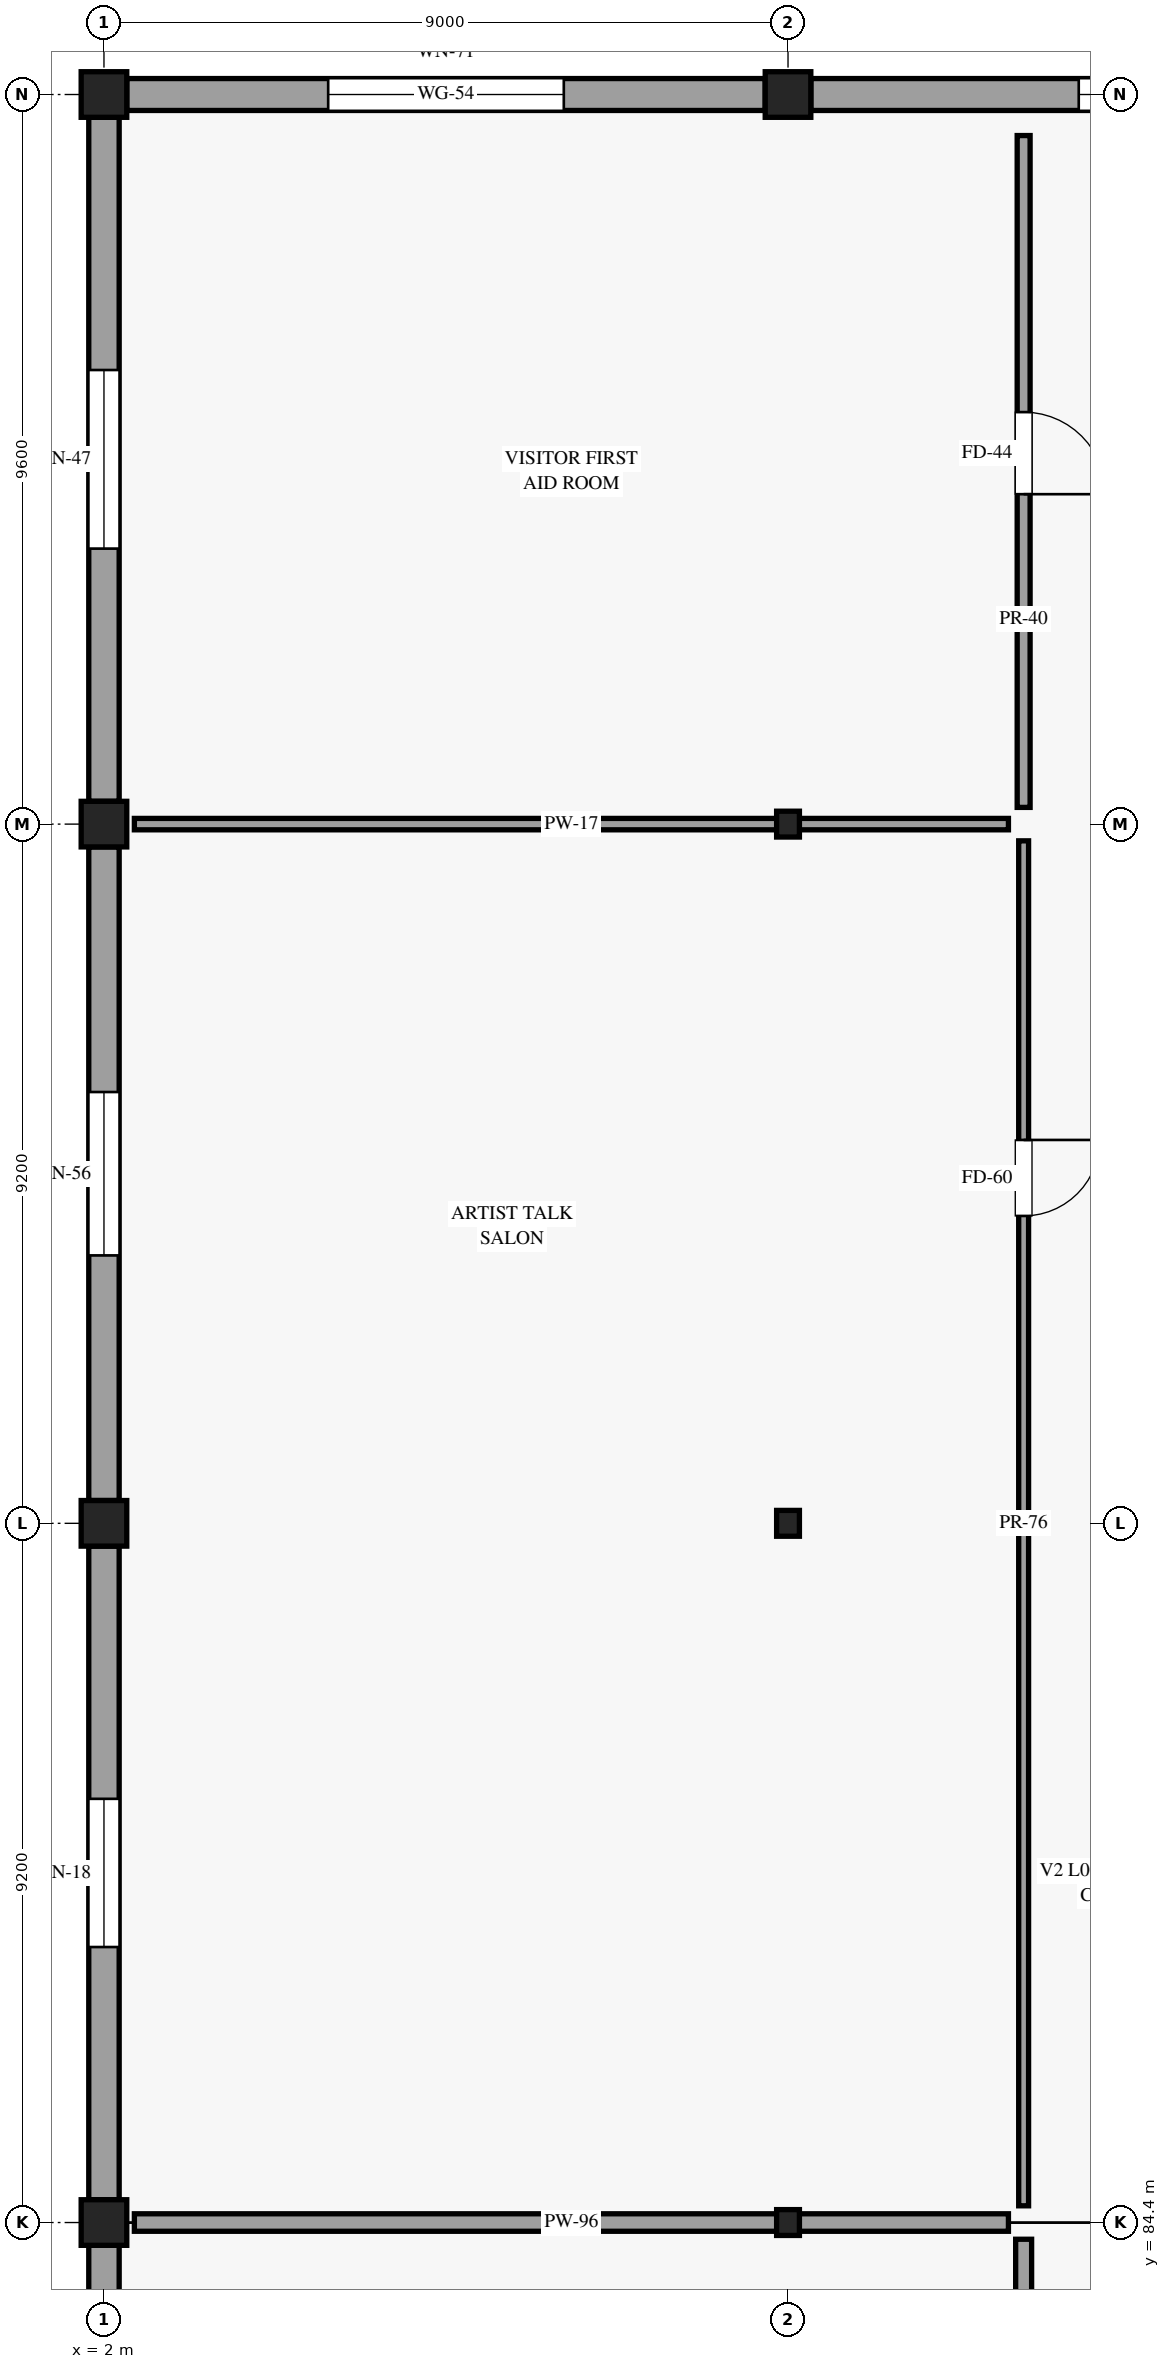
"""IFC4 building model, lengths in metres.
Left out: names, types, materials, properties, quantities, classifications, styles, units other than length and angle.
Written with IfcOpenShell. Run it as: python <this file> out.ifc"""

import sys

from ifc_helpers import new_model, si_unit, direction, frame, frame_2d, origin, origin_2d, place, context, subcontext, project, spatial, rectangle, i_section, extrude, element, fill, save


model = new_model("IFC4")
c1 = context("Model", 3, precision=1e-05, world=origin(), true_north=direction((0.0, 1.0)))
c2 = subcontext(c1, "Body", "Model", "MODEL_VIEW")
j1 = project(units=[si_unit("LENGTHUNIT", "METRE"), si_unit("PLANEANGLEUNIT", "RADIAN")], contexts=[c1])
p1 = place(None, origin())
s1 = spatial("IfcSite", under=j1, at=p1, CompositionType="ELEMENT")
p2 = place(p1, origin())
s2 = spatial("IfcBuilding", under=s1, at=p2, CompositionType="ELEMENT")
p3 = place(p2, origin())
s3 = spatial("IfcBuildingStorey", under=s2, at=p3, CompositionType="ELEMENT", Elevation=0.0)
for number, where, z_axis, x_axis in (
    (1, (2.0, 84.4, 0.0), (0.0, 0.0, 1.0), (1.0, 0.0, 0.0)),
    (2, (2.0, 93.6, 0.0), (0.0, 0.0, 1.0), (1.0, 0.0, 0.0)),
    (3, (2.0, 102.8, 0.0), (0.0, 0.0, 1.0), (1.0, 0.0, 0.0)),
    (4, (2.0, 112.4, 0.0), (0.0, 0.0, 1.0), (1.0, 0.0, 0.0)),
):
    element("IfcColumn", number, at=place(p3, frame(where, z_axis=z_axis, x_axis=x_axis)), inside=s3, PredefinedType="COLUMN", context=c2, shape_type="SweptSolid", body=[
        extrude(rectangle(XDim=0.6, YDim=0.6, at=origin_2d()), origin(), (0.0, 0.0, 1.0), 5.4),
    ])
for number, where, z_axis, x_axis in (
    (5, (11.0, 84.4, 0.0), (0.0, 0.0, 1.0), (1.0, 0.0, 0.0)),
    (6, (11.0, 93.6, 0.0), (0.0, 0.0, 1.0), (1.0, 0.0, 0.0)),
    (7, (11.0, 102.8, 0.0), (0.0, 0.0, 1.0), (1.0, 0.0, 0.0)),
):
    element("IfcColumn", number, at=place(p3, frame(where, z_axis=z_axis, x_axis=x_axis)), inside=s3, PredefinedType="COLUMN", context=c2, shape_type="SweptSolid", body=[
        extrude(i_section(OverallWidth=0.3, OverallDepth=0.34, WebThickness=0.012, FlangeThickness=0.021, FilletRadius=0.027, at=origin_2d()), origin(), (0.0, 0.0, 1.0), 5.4),
    ])
p4 = place(p3, frame((11.0, 112.4, 0.0), z_axis=(0.0, 0.0, 1.0), x_axis=(1.0, 0.0, 0.0)))
e8 = element("IfcColumn", 8, at=p4, inside=s3, PredefinedType="COLUMN", context=c2, shape_type="SweptSolid", body=[
    extrude(rectangle(XDim=0.6, YDim=0.6, at=origin_2d()), origin(), (0.0, 0.0, 1.0), 5.4),
])
p5 = place(p3, frame((2.3, 112.4, 0.0), z_axis=(0.0, 0.0, 1.0), x_axis=(1.0, 0.0, 0.0)))
e9 = element("IfcWall", 9, at=p5, inside=s3, PredefinedType="STANDARD", context=c2, shape_type="SweptSolid", body=[
    extrude(rectangle(XDim=8.4, YDim=0.42, at=frame_2d((4.2, 0.0))), origin(), (0.0, 0.0, 1.0), 4.605),
])
p6 = place(p5, frame((2.65, 0.0, 0.85)))
e10 = element("IfcOpeningElement", 10, at=p6, cuts=e9, PredefinedType="OPENING", context=c2, shape_type="SweptSolid", body=[
    extrude(rectangle(XDim=3.1, YDim=2.3, at=frame_2d((1.55, 1.15))), frame((0.0, 0.22, 0.0), z_axis=(0.0, -1.0, 0.0), x_axis=(1.0, 0.0, 0.0)), (0.0, 0.0, 1.0), 0.44),
])
p7 = place(p3, frame((11.3, 112.4, 0.0), z_axis=(0.0, 0.0, 1.0), x_axis=(1.0, 0.0, 0.0)))
e11 = element("IfcWall", 11, at=p7, inside=s3, PredefinedType="STANDARD", context=c2, shape_type="SweptSolid", body=[
    extrude(rectangle(XDim=8.4, YDim=0.42, at=frame_2d((4.2, 0.0))), origin(), (0.0, 0.0, 1.0), 4.605),
])
p8 = place(p7, frame((3.525, 0.0, 0.85)))
e12 = element("IfcOpeningElement", 12, at=p8, cuts=e11, PredefinedType="OPENING", context=c2, shape_type="SweptSolid", body=[
    extrude(rectangle(XDim=1.35, YDim=1.75, at=frame_2d((0.675, 0.875))), frame((0.0, 0.22, 0.0), z_axis=(0.0, -1.0, 0.0), x_axis=(1.0, 0.0, 0.0)), (0.0, 0.0, 1.0), 0.44),
])
p9 = place(p3, frame((2.0, 75.5, 0.0), z_axis=(0.0, 0.0, 1.0), x_axis=(0.0, 1.0, 0.0)))
e13 = element("IfcWall", 13, at=p9, inside=s3, PredefinedType="STANDARD", context=c2, shape_type="SweptSolid", body=[
    extrude(rectangle(XDim=8.6, YDim=0.4, at=frame_2d((4.3, 0.0))), origin(), (0.0, 0.0, 1.0), 4.605),
])
p10 = place(p9, frame((3.425, 0.0, 0.85)))
e14 = element("IfcOpeningElement", 14, at=p10, cuts=e13, PredefinedType="OPENING", context=c2, shape_type="SweptSolid", body=[
    extrude(rectangle(XDim=1.75, YDim=2.05, at=frame_2d((0.875, 1.025))), frame((0.0, 0.21, 0.0), z_axis=(0.0, -1.0, 0.0), x_axis=(1.0, 0.0, 0.0)), (0.0, 0.0, 1.0), 0.42),
])
p11 = place(p3, frame((2.0, 84.7, 0.0), z_axis=(0.0, 0.0, 1.0), x_axis=(0.0, 1.0, 0.0)))
e15 = element("IfcWall", 15, at=p11, inside=s3, PredefinedType="STANDARD", context=c2, shape_type="SweptSolid", body=[
    extrude(rectangle(XDim=8.6, YDim=0.4, at=frame_2d((4.3, 0.0))), origin(), (0.0, 0.0, 1.0), 4.605),
])
p12 = place(p11, frame((3.325, 0.0, 0.85)))
e16 = element("IfcOpeningElement", 16, at=p12, cuts=e15, PredefinedType="OPENING", context=c2, shape_type="SweptSolid", body=[
    extrude(rectangle(XDim=1.95, YDim=2.15, at=frame_2d((0.975, 1.075))), frame((0.0, 0.21, 0.0), z_axis=(0.0, -1.0, 0.0), x_axis=(1.0, 0.0, 0.0)), (0.0, 0.0, 1.0), 0.42),
])
p13 = place(p3, frame((2.0, 93.9, 0.0), z_axis=(0.0, 0.0, 1.0), x_axis=(0.0, 1.0, 0.0)))
e17 = element("IfcWall", 17, at=p13, inside=s3, PredefinedType="STANDARD", context=c2, shape_type="SweptSolid", body=[
    extrude(rectangle(XDim=8.6, YDim=0.4, at=frame_2d((4.3, 0.0))), origin(), (0.0, 0.0, 1.0), 4.605),
])
p14 = place(p13, frame((3.225, 0.0, 0.85)))
e18 = element("IfcOpeningElement", 18, at=p14, cuts=e17, PredefinedType="OPENING", context=c2, shape_type="SweptSolid", body=[
    extrude(rectangle(XDim=2.15, YDim=2.25, at=frame_2d((1.075, 1.125))), frame((0.0, 0.21, 0.0), z_axis=(0.0, -1.0, 0.0), x_axis=(1.0, 0.0, 0.0)), (0.0, 0.0, 1.0), 0.42),
])
p15 = place(p3, frame((2.0, 103.1, 0.0), z_axis=(0.0, 0.0, 1.0), x_axis=(0.0, 1.0, 0.0)))
e19 = element("IfcWall", 19, at=p15, inside=s3, PredefinedType="STANDARD", context=c2, shape_type="SweptSolid", body=[
    extrude(rectangle(XDim=9.0, YDim=0.4, at=frame_2d((4.5, 0.0))), origin(), (0.0, 0.0, 1.0), 4.605),
])
p16 = place(p15, frame((3.325, 0.0, 0.85)))
e20 = element("IfcOpeningElement", 20, at=p16, cuts=e19, PredefinedType="OPENING", context=c2, shape_type="SweptSolid", body=[
    extrude(rectangle(XDim=2.35, YDim=2.35, at=frame_2d((1.175, 1.175))), frame((0.0, 0.21, 0.0), z_axis=(0.0, -1.0, 0.0), x_axis=(1.0, 0.0, 0.0)), (0.0, 0.0, 1.0), 0.42),
])
p17 = place(p3, frame((14.1, 75.42, 0.0), z_axis=(0.0, 0.0, 1.0), x_axis=(0.0, 1.0, 0.0)))
e21 = element("IfcWall", 21, at=p17, inside=s3, PredefinedType="PARTITIONING", context=c2, shape_type="SweptSolid", body=[
    extrude(rectangle(XDim=8.76, YDim=0.21, at=frame_2d((4.38, 0.0))), origin(), (0.0, 0.0, 1.0), 4.605),
])
p18 = place(p17, frame((4.83, 0.0, 0.0), z_axis=(0.0, 0.0, 1.0), x_axis=(-1.0, 0.0, 0.0)))
e22 = element("IfcOpeningElement", 22, at=p18, cuts=e21, PredefinedType="OPENING", context=c2, shape_type="SweptSolid", body=[
    extrude(rectangle(XDim=0.95, YDim=2.15, at=frame_2d((0.475, 1.075))), frame((0.0, 0.115, 0.0), z_axis=(0.0, -1.0, 0.0), x_axis=(1.0, 0.0, 0.0)), (0.0, 0.0, 1.0), 0.23),
])
p19 = place(p3, frame((2.4, 84.4, 0.0), z_axis=(0.0, 0.0, 1.0), x_axis=(1.0, 0.0, 0.0)))
e23 = element("IfcWall", 23, at=p19, inside=s3, PredefinedType="PARTITIONING", context=c2, shape_type="SweptSolid", body=[
    extrude(rectangle(XDim=11.5, YDim=0.23, at=frame_2d((5.75, 0.0))), origin(), (0.0, 0.0, 1.0), 4.605),
])
p20 = place(p3, frame((14.1, 84.62, 0.0), z_axis=(0.0, 0.0, 1.0), x_axis=(0.0, 1.0, 0.0)))
e24 = element("IfcWall", 24, at=p20, inside=s3, PredefinedType="PARTITIONING", context=c2, shape_type="SweptSolid", body=[
    extrude(rectangle(XDim=17.96, YDim=0.13, at=frame_2d((8.98, 0.0))), origin(), (0.0, 0.0, 1.0), 4.605),
])
p21 = place(p20, frame((14.024, 0.0, 0.0), z_axis=(0.0, 0.0, 1.0), x_axis=(-1.0, 0.0, 0.0)))
e25 = element("IfcOpeningElement", 25, at=p21, cuts=e24, PredefinedType="OPENING", context=c2, shape_type="SweptSolid", body=[
    extrude(rectangle(XDim=1.0, YDim=2.2, at=frame_2d((0.5, 1.1))), frame((0.0, 0.075, 0.0), z_axis=(0.0, -1.0, 0.0), x_axis=(1.0, 0.0, 0.0)), (0.0, 0.0, 1.0), 0.15),
])
p22 = place(p3, frame((2.4, 102.8, 0.0), z_axis=(0.0, 0.0, 1.0), x_axis=(1.0, 0.0, 0.0)))
e26 = element("IfcWall", 26, at=p22, inside=s3, PredefinedType="PARTITIONING", context=c2, shape_type="SweptSolid", body=[
    extrude(rectangle(XDim=11.5, YDim=0.15, at=frame_2d((5.75, 0.0))), origin(), (0.0, 0.0, 1.0), 4.605),
])
p23 = place(p3, frame((14.1, 103.02, 0.0), z_axis=(0.0, 0.0, 1.0), x_axis=(0.0, 1.0, 0.0)))
e27 = element("IfcWall", 27, at=p23, inside=s3, PredefinedType="PARTITIONING", context=c2, shape_type="SweptSolid", body=[
    extrude(rectangle(XDim=8.84, YDim=0.17, at=frame_2d((4.42, 0.0))), origin(), (0.0, 0.0, 1.0), 4.605),
])
p24 = place(p23, frame((5.201, 0.0, 0.0), z_axis=(0.0, 0.0, 1.0), x_axis=(-1.0, 0.0, 0.0)))
e28 = element("IfcOpeningElement", 28, at=p24, cuts=e27, PredefinedType="OPENING", context=c2, shape_type="SweptSolid", body=[
    extrude(rectangle(XDim=1.08, YDim=2.24, at=frame_2d((0.54, 1.12))), frame((0.0, 0.095, 0.0), z_axis=(0.0, -1.0, 0.0), x_axis=(1.0, 0.0, 0.0)), (0.0, 0.0, 1.0), 0.19),
])
p25 = place(p6, origin())
e29 = element("IfcWindow", 29, at=p25, inside=s3, PartitioningType="SINGLE_PANEL", PredefinedType="WINDOW", context=c2, shape_type="SweptSolid", body=[
    extrude(rectangle(XDim=3.1, YDim=2.3, at=frame_2d((1.55, 1.15))), frame((0.0, 0.03, 0.0), z_axis=(0.0, -1.0, 0.0), x_axis=(1.0, 0.0, 0.0)), (0.0, 0.0, 1.0), 0.06),
])
fill(e10, e29)
p26 = place(p8, origin())
e30 = element("IfcWindow", 30, at=p26, inside=s3, PartitioningType="SINGLE_PANEL", PredefinedType="WINDOW", context=c2, shape_type="SweptSolid", body=[
    extrude(rectangle(XDim=1.35, YDim=1.75, at=frame_2d((0.675, 0.875))), frame((0.0, 0.03, 0.0), z_axis=(0.0, -1.0, 0.0), x_axis=(1.0, 0.0, 0.0)), (0.0, 0.0, 1.0), 0.06),
])
fill(e12, e30)
p27 = place(p12, origin())
e31 = element("IfcWindow", 31, at=p27, inside=s3, PartitioningType="SINGLE_PANEL", PredefinedType="WINDOW", context=c2, shape_type="SweptSolid", body=[
    extrude(rectangle(XDim=1.95, YDim=2.15, at=frame_2d((0.975, 1.075))), frame((0.0, 0.03, 0.0), z_axis=(0.0, -1.0, 0.0), x_axis=(1.0, 0.0, 0.0)), (0.0, 0.0, 1.0), 0.06),
])
fill(e16, e31)
p28 = place(p14, origin())
e32 = element("IfcWindow", 32, at=p28, inside=s3, PartitioningType="SINGLE_PANEL", PredefinedType="WINDOW", context=c2, shape_type="SweptSolid", body=[
    extrude(rectangle(XDim=2.15, YDim=2.25, at=frame_2d((1.075, 1.125))), frame((0.0, 0.03, 0.0), z_axis=(0.0, -1.0, 0.0), x_axis=(1.0, 0.0, 0.0)), (0.0, 0.0, 1.0), 0.06),
])
fill(e18, e32)
p29 = place(p16, origin())
e33 = element("IfcWindow", 33, at=p29, inside=s3, PartitioningType="SINGLE_PANEL", PredefinedType="WINDOW", context=c2, shape_type="SweptSolid", body=[
    extrude(rectangle(XDim=2.35, YDim=2.35, at=frame_2d((1.175, 1.175))), frame((0.0, 0.03, 0.0), z_axis=(0.0, -1.0, 0.0), x_axis=(1.0, 0.0, 0.0)), (0.0, 0.0, 1.0), 0.06),
])
fill(e20, e33)
p30 = place(p21, origin())
e34 = element("IfcDoor", 34, at=p30, inside=s3, OperationType="SINGLE_SWING_LEFT", PredefinedType="DOOR", context=c2, shape_type="SweptSolid", body=[
    extrude(rectangle(XDim=1.0, YDim=2.2, at=frame_2d((0.5, 1.1))), frame((0.0, 0.025, 0.0), z_axis=(0.0, -1.0, 0.0), x_axis=(1.0, 0.0, 0.0)), (0.0, 0.0, 1.0), 0.05),
])
fill(e25, e34)
p31 = place(p24, origin())
e35 = element("IfcDoor", 35, at=p31, inside=s3, OperationType="SINGLE_SWING_RIGHT", PredefinedType="DOOR", context=c2, shape_type="SweptSolid", body=[
    extrude(rectangle(XDim=1.08, YDim=2.24, at=frame_2d((0.54, 1.12))), frame((0.0, 0.025, 0.0), z_axis=(0.0, -1.0, 0.0), x_axis=(1.0, 0.0, 0.0)), (0.0, 0.0, 1.0), 0.05),
])
fill(e28, e35)
save(model, sys.argv[1])
